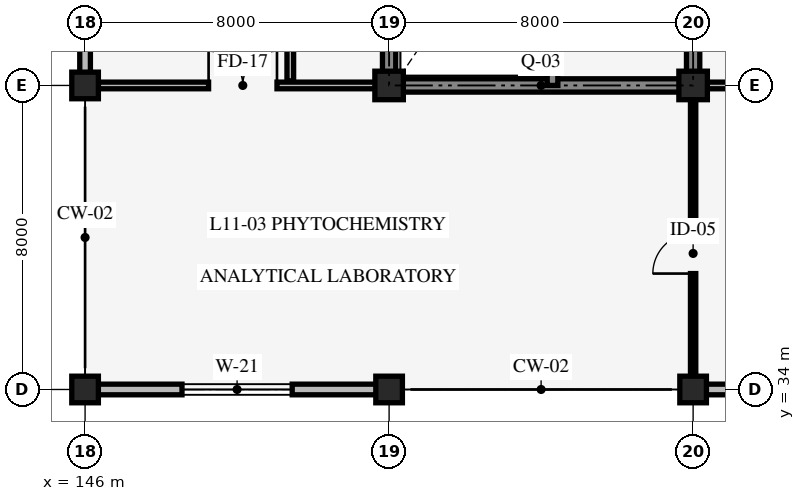
"""IFC4 building model, lengths in metres.
Left out: names, types, materials, properties, quantities, classifications, styles, units other than length and angle.
Written with IfcOpenShell. Run it as: python <this file> out.ifc"""

import sys

from ifc_helpers import new_model, si_unit, direction, frame, frame_2d, origin, origin_2d, place, context, subcontext, project, spatial, rectangle, extrude, element, fill, save


model = new_model("IFC4")
c1 = context("Model", 3, precision=1e-05, world=origin(), true_north=direction((0.0, 1.0)))
c2 = subcontext(c1, "Body", "Model", "MODEL_VIEW")
j1 = project(units=[si_unit("LENGTHUNIT", "METRE"), si_unit("PLANEANGLEUNIT", "RADIAN")], contexts=[c1])
p1 = place(None, origin())
s1 = spatial("IfcSite", under=j1, at=p1, CompositionType="ELEMENT")
p2 = place(p1, origin())
s2 = spatial("IfcBuilding", under=s1, at=p2, CompositionType="ELEMENT")
p3 = place(p2, frame((0.0, 0.0, 44.4)))
s3 = spatial("IfcBuildingStorey", under=s2, at=p3, CompositionType="ELEMENT", Elevation=44.4)
p4 = place(p3, frame((154.0, 42.0, 0.0), z_axis=(0.0, 0.0, 1.0), x_axis=(1.0, 0.0, 0.0)))
e1 = element("IfcWall", 1, at=p4, inside=s3, PredefinedType="SHEAR", context=c2, shape_type="SweptSolid", body=[
    extrude(rectangle(XDim=8.0, YDim=0.35, at=frame_2d((4.0, 0.0))), origin(), (0.0, 0.0, 1.0), 3.95),
])
p5 = place(p3, frame((162.0, 42.0, 0.0), z_axis=(0.0, 0.0, 1.0), x_axis=(0.0, 1.0, 0.0)))
e2 = element("IfcWall", 2, at=p5, inside=s3, PredefinedType="SHEAR", context=c2, shape_type="SweptSolid", body=[
    extrude(rectangle(XDim=8.0, YDim=0.35, at=frame_2d((4.0, 0.0))), origin(), (0.0, 0.0, 1.0), 3.95),
])
p6 = place(p5, frame((3.175, 0.0, 0.0)))
e3 = element("IfcOpeningElement", 3, at=p6, cuts=e2, PredefinedType="OPENING", context=c2, shape_type="SweptSolid", body=[
    extrude(rectangle(XDim=1.05, YDim=2.2, at=frame_2d((0.525, 1.1))), frame((0.0, 0.185, 0.0), z_axis=(0.0, -1.0, 0.0), x_axis=(1.0, 0.0, 0.0)), (0.0, 0.0, 1.0), 0.37),
])
p7 = place(p3, frame((154.0, 50.0, 0.0), z_axis=(0.0, 0.0, 1.0), x_axis=(0.0, -1.0, 0.0)))
e4 = element("IfcWall", 4, at=p7, inside=s3, PredefinedType="SHEAR", context=c2, shape_type="SweptSolid", body=[
    extrude(rectangle(XDim=8.0, YDim=0.35, at=frame_2d((4.0, 0.0))), origin(), (0.0, 0.0, 1.0), 3.95),
])
p8 = place(p3, frame((158.3, 42.0, 0.0), z_axis=(0.0, 0.0, 1.0), x_axis=(0.0, 1.0, 0.0)))
e5 = element("IfcWall", 5, at=p8, inside=s3, PredefinedType="SHEAR", context=c2, shape_type="SweptSolid", body=[
    extrude(rectangle(XDim=8.0, YDim=0.28, at=frame_2d((4.0, 0.0))), origin(), (0.0, 0.0, 1.0), 3.95),
])
for number, where, z_axis, x_axis in (
    (6, (146.0, 34.0, 0.0), (0.0, 0.0, 1.0), (1.0, 0.0, 0.0)),
    (7, (146.0, 42.0, 0.0), (0.0, 0.0, 1.0), (1.0, 0.0, 0.0)),
    (8, (154.0, 34.0, 0.0), (0.0, 0.0, 1.0), (1.0, 0.0, 0.0)),
):
    element("IfcColumn", number, at=place(p3, frame(where, z_axis=z_axis, x_axis=x_axis)), inside=s3, PredefinedType="COLUMN", context=c2, shape_type="SweptSolid", body=[
        extrude(rectangle(XDim=0.7, YDim=0.7, at=origin_2d()), origin(), (0.0, 0.0, 1.0), 4.2),
    ])
p9 = place(p3, frame((154.0, 42.0, 0.0), z_axis=(0.0, 0.0, 1.0), x_axis=(1.0, 0.0, 0.0)))
e9 = element("IfcColumn", 9, at=p9, inside=s3, PredefinedType="COLUMN", context=c2, shape_type="SweptSolid", body=[
    extrude(rectangle(XDim=0.75, YDim=0.75, at=origin_2d()), origin(), (0.0, 0.0, 1.0), 4.2),
])
p10 = place(p3, frame((162.0, 34.0, 0.0), z_axis=(0.0, 0.0, 1.0), x_axis=(1.0, 0.0, 0.0)))
e10 = element("IfcColumn", 10, at=p10, inside=s3, PredefinedType="COLUMN", context=c2, shape_type="SweptSolid", body=[
    extrude(rectangle(XDim=0.7, YDim=0.7, at=origin_2d()), origin(), (0.0, 0.0, 1.0), 4.2),
])
p11 = place(p3, frame((162.0, 42.0, 0.0), z_axis=(0.0, 0.0, 1.0), x_axis=(1.0, 0.0, 0.0)))
e11 = element("IfcColumn", 11, at=p11, inside=s3, PredefinedType="COLUMN", context=c2, shape_type="SweptSolid", body=[
    extrude(rectangle(XDim=0.75, YDim=0.75, at=origin_2d()), origin(), (0.0, 0.0, 1.0), 4.2),
])
p12 = place(p3, frame((170.0, 34.0, 0.0), z_axis=(0.0, 0.0, 1.0), x_axis=(-1.0, 0.0, 0.0)))
e12 = element("IfcWall", 12, at=p12, inside=s3, PredefinedType="STANDARD", context=c2, shape_type="SweptSolid", body=[
    extrude(rectangle(XDim=8.0, YDim=0.28, at=frame_2d((4.0, 0.0))), origin(), (0.0, 0.0, 1.0), 3.19),
])
p13 = place(p12, frame((3.4, 0.0, 0.85)))
e13 = element("IfcOpeningElement", 13, at=p13, cuts=e12, PredefinedType="OPENING", context=c2, shape_type="SweptSolid", body=[
    extrude(rectangle(XDim=1.2, YDim=1.2, at=frame_2d((0.6, 0.6))), frame((0.0, 0.15, 0.0), z_axis=(0.0, -1.0, 0.0), x_axis=(1.0, 0.0, 0.0)), (0.0, 0.0, 1.0), 0.3),
])
p14 = place(p3, frame((154.0, 34.0, 0.0), z_axis=(0.0, 0.0, 1.0), x_axis=(-1.0, 0.0, 0.0)))
e14 = element("IfcWall", 14, at=p14, inside=s3, PredefinedType="STANDARD", context=c2, shape_type="SweptSolid", body=[
    extrude(rectangle(XDim=8.0, YDim=0.28, at=frame_2d((4.0, 0.0))), origin(), (0.0, 0.0, 1.0), 3.19),
])
p15 = place(p14, frame((2.55, 0.0, 0.85)))
e15 = element("IfcOpeningElement", 15, at=p15, cuts=e14, PredefinedType="OPENING", context=c2, shape_type="SweptSolid", body=[
    extrude(rectangle(XDim=2.9, YDim=1.7, at=frame_2d((1.45, 0.85))), frame((0.0, 0.15, 0.0), z_axis=(0.0, -1.0, 0.0), x_axis=(1.0, 0.0, 0.0)), (0.0, 0.0, 1.0), 0.3),
])
p16 = place(p3, frame((146.0, 42.0, 0.0), z_axis=(0.0, 0.0, 1.0), x_axis=(0.0, 1.0, 0.0)))
e16 = element("IfcWall", 16, at=p16, inside=s3, PredefinedType="STANDARD", context=c2, shape_type="SweptSolid", body=[
    extrude(rectangle(XDim=8.0, YDim=0.28, at=frame_2d((4.0, 0.0))), origin(), (0.0, 0.0, 1.0), 3.24),
])
p17 = place(p16, frame((3.05, 0.0, 0.85)))
e17 = element("IfcOpeningElement", 17, at=p17, cuts=e16, PredefinedType="OPENING", context=c2, shape_type="SweptSolid", body=[
    extrude(rectangle(XDim=1.9, YDim=1.3, at=frame_2d((0.95, 0.65))), frame((0.0, 0.15, 0.0), z_axis=(0.0, -1.0, 0.0), x_axis=(1.0, 0.0, 0.0)), (0.0, 0.0, 1.0), 0.3),
])
p18 = place(p3, frame((151.4, 42.12, 0.0), z_axis=(0.0, 0.0, 1.0), x_axis=(0.0, 1.0, 0.0)))
e18 = element("IfcWall", 18, at=p18, inside=s3, PredefinedType="STANDARD", context=c2, shape_type="SweptSolid", body=[
    extrude(rectangle(XDim=7.76, YDim=0.175, at=frame_2d((3.88, 0.0))), origin(), (0.0, 0.0, 1.0), 3.9),
])
p19 = place(p18, frame((3.13, 0.0, 0.0)))
e19 = element("IfcOpeningElement", 19, at=p19, cuts=e18, PredefinedType="OPENING", context=c2, shape_type="SweptSolid", body=[
    extrude(rectangle(XDim=1.5, YDim=2.2, at=frame_2d((0.75, 1.1))), frame((0.0, 0.098, 0.0), z_axis=(0.0, -1.0, 0.0), x_axis=(1.0, 0.0, 0.0)), (0.0, 0.0, 1.0), 0.195),
])
p20 = place(p3, frame((146.35, 42.0, 0.0), z_axis=(0.0, 0.0, 1.0), x_axis=(1.0, 0.0, 0.0)))
e20 = element("IfcWall", 20, at=p20, inside=s3, PredefinedType="STANDARD", context=c2, shape_type="SweptSolid", body=[
    extrude(rectangle(XDim=7.3, YDim=0.175, at=frame_2d((3.65, 0.0))), origin(), (0.0, 0.0, 1.0), 3.19),
])
p21 = place(p20, frame((2.9, 0.0, 0.0)))
e21 = element("IfcOpeningElement", 21, at=p21, cuts=e20, PredefinedType="OPENING", context=c2, shape_type="SweptSolid", body=[
    extrude(rectangle(XDim=1.8, YDim=2.3, at=frame_2d((0.9, 1.15))), frame((0.0, 0.098, 0.0), z_axis=(0.0, -1.0, 0.0), x_axis=(1.0, 0.0, 0.0)), (0.0, 0.0, 1.0), 0.195),
])
p22 = place(p3, frame((162.0, 34.05, 0.0), z_axis=(0.0, 0.0, 1.0), x_axis=(0.0, 1.0, 0.0)))
e22 = element("IfcWall", 22, at=p22, inside=s3, PredefinedType="STANDARD", context=c2, shape_type="SweptSolid", body=[
    extrude(rectangle(XDim=7.83, YDim=0.14, at=frame_2d((3.915, 0.0))), origin(), (0.0, 0.0, 1.0), 3.24),
])
p23 = place(p22, frame((3.0, 0.0, 0.0)))
e23 = element("IfcOpeningElement", 23, at=p23, cuts=e22, PredefinedType="OPENING", context=c2, shape_type="SweptSolid", body=[
    extrude(rectangle(XDim=1.06, YDim=2.12, at=frame_2d((0.53, 1.06))), frame((0.0, 0.08, 0.0), z_axis=(0.0, -1.0, 0.0), x_axis=(1.0, 0.0, 0.0)), (0.0, 0.0, 1.0), 0.16),
])
p24 = place(p3, frame((162.35, 42.0, 0.0), z_axis=(0.0, 0.0, 1.0), x_axis=(1.0, 0.0, 0.0)))
e24 = element("IfcWall", 24, at=p24, inside=s3, PredefinedType="STANDARD", context=c2, shape_type="SweptSolid", body=[
    extrude(rectangle(XDim=14.7, YDim=0.175, at=frame_2d((7.35, 0.0))), origin(), (0.0, 0.0, 1.0), 3.19),
])
p25 = place(p24, frame((2.75, 0.0, 0.0)))
e25 = element("IfcOpeningElement", 25, at=p25, cuts=e24, PredefinedType="OPENING", context=c2, shape_type="SweptSolid", body=[
    extrude(rectangle(XDim=1.9, YDim=2.35, at=frame_2d((0.95, 1.175))), frame((0.0, 0.098, 0.0), z_axis=(0.0, -1.0, 0.0), x_axis=(1.0, 0.0, 0.0)), (0.0, 0.0, 1.0), 0.195),
])
p26 = place(p15, origin())
e26 = element("IfcWindow", 26, at=p26, inside=s3, PartitioningType="SINGLE_PANEL", PredefinedType="WINDOW", context=c2, shape_type="SweptSolid", body=[
    extrude(rectangle(XDim=2.9, YDim=1.7, at=frame_2d((1.45, 0.85))), frame((0.0, 0.03, 0.0), z_axis=(0.0, -1.0, 0.0), x_axis=(1.0, 0.0, 0.0)), (0.0, 0.0, 1.0), 0.06),
])
fill(e15, e26)
p27 = place(p21, origin())
e27 = element("IfcDoor", 27, at=p27, inside=s3, OperationType="DOUBLE_DOOR_SINGLE_SWING", PredefinedType="DOOR", context=c2, shape_type="SweptSolid", body=[
    extrude(rectangle(XDim=1.8, YDim=2.3, at=frame_2d((0.9, 1.15))), frame((0.0, 0.025, 0.0), z_axis=(0.0, -1.0, 0.0), x_axis=(1.0, 0.0, 0.0)), (0.0, 0.0, 1.0), 0.05),
])
fill(e21, e27)
p28 = place(p23, origin())
e28 = element("IfcDoor", 28, at=p28, inside=s3, OperationType="SINGLE_SWING_LEFT", PredefinedType="DOOR", context=c2, shape_type="SweptSolid", body=[
    extrude(rectangle(XDim=1.06, YDim=2.12, at=frame_2d((0.53, 1.06))), frame((0.0, 0.025, 0.0), z_axis=(0.0, -1.0, 0.0), x_axis=(1.0, 0.0, 0.0)), (0.0, 0.0, 1.0), 0.05),
])
fill(e23, e28)
save(model, sys.argv[1])
